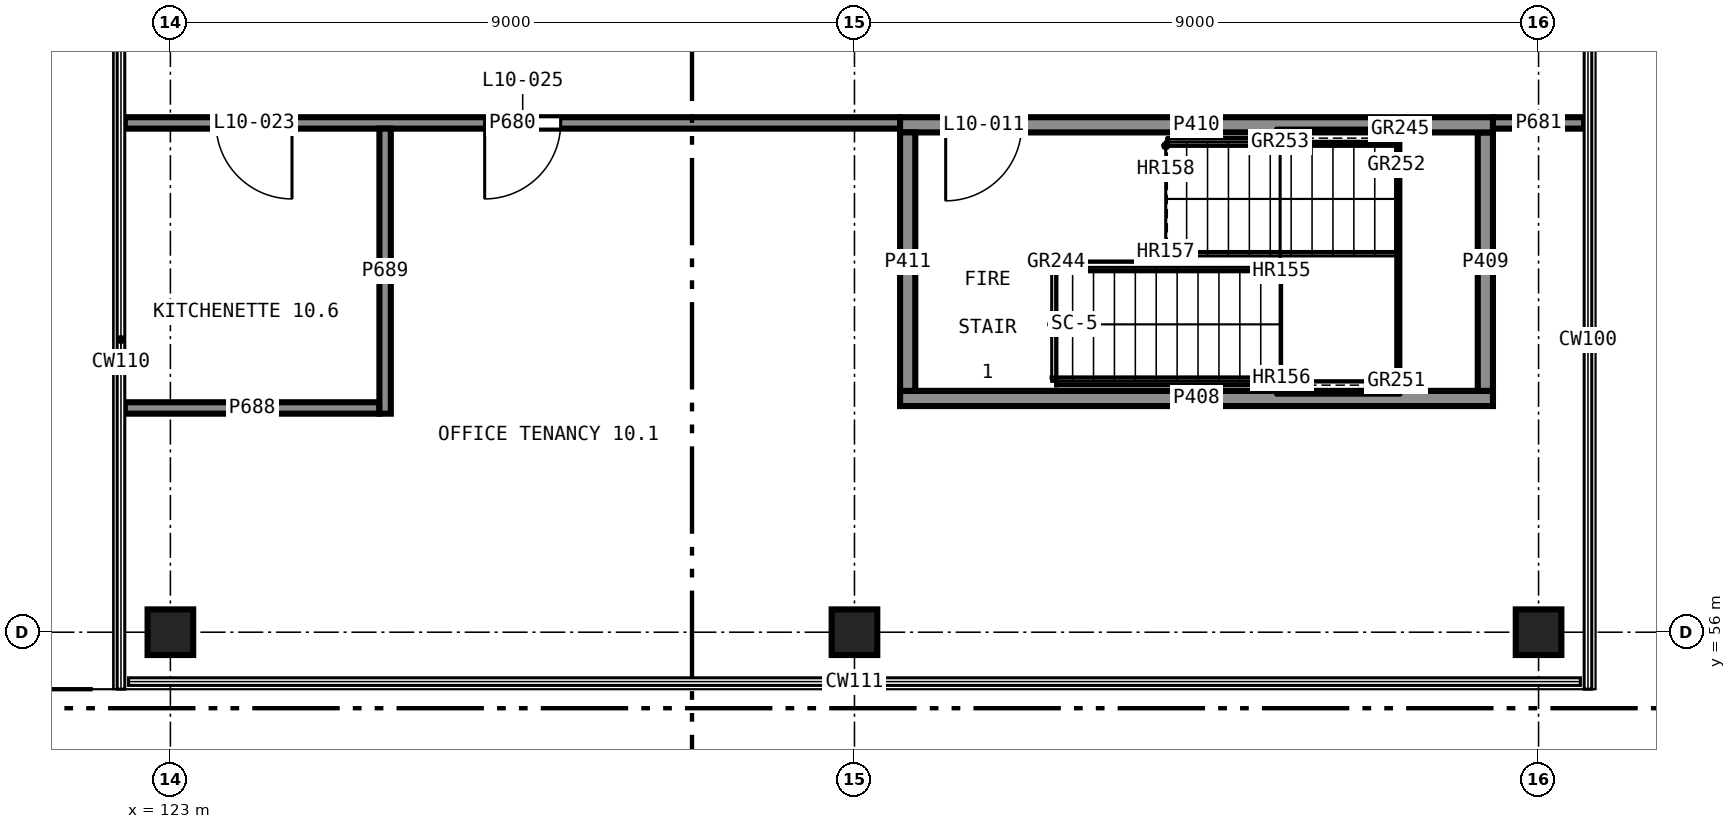
"""IFC4 building model, lengths in metres.
Left out: names, types, materials, properties, quantities, classifications, styles, units other than length and angle.
Written with IfcOpenShell. Run it as: python <this file> out.ifc"""

import sys

from ifc_helpers import new_model, si_unit, direction, frame, frame_2d, origin, origin_2d, place, context, subcontext, project, spatial, rectangle, extrude, element, fill, save


model = new_model("IFC4")
c1 = context("Model", 3, precision=1e-05, world=origin(), true_north=direction((0.0, 1.0)))
c2 = subcontext(c1, "Body", "Model", "MODEL_VIEW")
j1 = project(units=[si_unit("LENGTHUNIT", "METRE"), si_unit("PLANEANGLEUNIT", "RADIAN")], contexts=[c1])
p1 = place(None, origin())
s1 = spatial("IfcSite", under=j1, at=p1, CompositionType="ELEMENT")
p2 = place(p1, origin())
s2 = spatial("IfcBuilding", under=s1, at=p2, CompositionType="ELEMENT")
p3 = place(p2, frame((0.0, 0.0, 41.5)))
s3 = spatial("IfcBuildingStorey", under=s2, at=p3, CompositionType="ELEMENT", Elevation=41.5)
for number, where, z_axis, x_axis in (
    (1, (123.0, 56.0, 0.0), (0.0, 0.0, 1.0), (1.0, 0.0, 0.0)),
    (2, (132.0, 56.0, 0.0), (0.0, 0.0, 1.0), (1.0, 0.0, 0.0)),
    (3, (141.0, 56.0, 0.0), (0.0, 0.0, 1.0), (1.0, 0.0, 0.0)),
):
    element("IfcColumn", number, at=place(p3, frame(where, z_axis=z_axis, x_axis=x_axis)), inside=s3, PredefinedType="COLUMN", context=c2, shape_type="SweptSolid", body=[
        extrude(rectangle(XDim=0.6, YDim=0.6, at=origin_2d()), origin(), (0.0, 0.0, 1.0), 4.0),
    ])
p4 = place(p3, frame((132.6, 59.075, 0.0), z_axis=(0.0, 0.0, 1.0), x_axis=(1.0, 0.0, 0.0)))
e4 = element("IfcWall", 4, at=p4, inside=s3, PredefinedType="SHEAR", context=c2, shape_type="SweptSolid", body=[
    extrude(rectangle(XDim=7.8, YDim=0.2, at=frame_2d((3.9, 0.0))), origin(), (0.0, 0.0, 1.0), 3.75),
])
p5 = place(p3, frame((140.3, 59.175, 0.0), z_axis=(0.0, 0.0, 1.0), x_axis=(0.0, 1.0, 0.0)))
e5 = element("IfcWall", 5, at=p5, inside=s3, PredefinedType="SHEAR", context=c2, shape_type="SweptSolid", body=[
    extrude(rectangle(XDim=3.4, YDim=0.2, at=frame_2d((1.7, 0.0))), origin(), (0.0, 0.0, 1.0), 3.75),
])
p6 = place(p3, frame((140.4, 62.675, 0.0), z_axis=(0.0, 0.0, 1.0), x_axis=(-1.0, 0.0, 0.0)))
e6 = element("IfcWall", 6, at=p6, inside=s3, PredefinedType="SHEAR", context=c2, shape_type="SweptSolid", body=[
    extrude(rectangle(XDim=7.8, YDim=0.2, at=frame_2d((3.9, 0.0))), origin(), (0.0, 0.0, 1.0), 3.75),
])
p7 = place(p6, frame((6.2, 0.0, 0.0)))
e7 = element("IfcOpeningElement", 7, at=p7, cuts=e6, PredefinedType="OPENING", context=c2, shape_type="SweptSolid", body=[
    extrude(rectangle(XDim=1.0, YDim=2.1, at=frame_2d((0.5, 1.05))), frame((0.0, 0.11, 0.0), z_axis=(0.0, -1.0, 0.0), x_axis=(1.0, 0.0, 0.0)), (0.0, 0.0, 1.0), 0.22),
])
p8 = place(p3, frame((132.7, 62.575, 0.0), z_axis=(0.0, 0.0, 1.0), x_axis=(0.0, -1.0, 0.0)))
e8 = element("IfcWall", 8, at=p8, inside=s3, PredefinedType="SHEAR", context=c2, shape_type="SweptSolid", body=[
    extrude(rectangle(XDim=3.4, YDim=0.2, at=frame_2d((1.7, 0.0))), origin(), (0.0, 0.0, 1.0), 3.75),
])
p9 = place(p3, frame((132.6, 62.7, 0.0), z_axis=(0.0, 0.0, 1.0), x_axis=(-1.0, 0.0, 0.0)))
e9 = element("IfcWall", 9, at=p9, inside=s3, PredefinedType="PARTITIONING", context=c2, shape_type="SweptSolid", body=[
    extrude(rectangle(XDim=10.2, YDim=0.15, at=frame_2d((5.1, 0.0))), origin(), (0.0, 0.0, 1.0), 3.75),
])
p10 = place(p9, frame((8.0, 0.0, 0.0)))
e10 = element("IfcOpeningElement", 10, at=p10, cuts=e9, PredefinedType="OPENING", context=c2, shape_type="SweptSolid", body=[
    extrude(rectangle(XDim=1.0, YDim=2.1, at=frame_2d((0.5, 1.05))), frame((0.0, 0.085, 0.0), z_axis=(0.0, -1.0, 0.0), x_axis=(1.0, 0.0, 0.0)), (0.0, 0.0, 1.0), 0.17),
])
p11 = place(p9, frame((4.465, 0.0, 0.0)))
e11 = element("IfcOpeningElement", 11, at=p11, cuts=e9, PredefinedType="OPENING", context=c2, shape_type="SweptSolid", body=[
    extrude(rectangle(XDim=1.0, YDim=2.1, at=frame_2d((0.5, 1.05))), frame((0.0, 0.085, 0.0), z_axis=(0.0, -1.0, 0.0), x_axis=(1.0, 0.0, 0.0)), (0.0, 0.0, 1.0), 0.17),
])
p12 = place(p3, frame((141.6, 62.7, 0.0), z_axis=(0.0, 0.0, 1.0), x_axis=(-1.0, 0.0, 0.0)))
e12 = element("IfcWall", 12, at=p12, inside=s3, PredefinedType="PARTITIONING", context=c2, shape_type="SweptSolid", body=[
    extrude(rectangle(XDim=1.2, YDim=0.15, at=frame_2d((0.6, 0.0))), origin(), (0.0, 0.0, 1.0), 3.75),
])
p13 = place(p3, frame((122.4, 58.95, 0.0), z_axis=(0.0, 0.0, 1.0), x_axis=(1.0, 0.0, 0.0)))
e13 = element("IfcWall", 13, at=p13, inside=s3, PredefinedType="PARTITIONING", context=c2, shape_type="SweptSolid", body=[
    extrude(rectangle(XDim=3.35, YDim=0.15, at=frame_2d((1.675, 0.0))), origin(), (0.0, 0.0, 1.0), 3.75),
])
p14 = place(p3, frame((125.825, 62.625, 0.0), z_axis=(0.0, 0.0, 1.0), x_axis=(0.0, -1.0, 0.0)))
e14 = element("IfcWall", 14, at=p14, inside=s3, PredefinedType="PARTITIONING", context=c2, shape_type="SweptSolid", body=[
    extrude(rectangle(XDim=3.75, YDim=0.15, at=frame_2d((1.875, 0.0))), origin(), (0.0, 0.0, 1.0), 3.75),
])
p15 = place(p7, origin())
e15 = element("IfcDoor", 15, at=p15, inside=s3, OperationType="SINGLE_SWING_LEFT", PredefinedType="DOOR", context=c2, shape_type="SweptSolid", body=[
    extrude(rectangle(XDim=1.0, YDim=2.1, at=frame_2d((0.5, 1.05))), frame((0.0, 0.025, 0.0), z_axis=(0.0, -1.0, 0.0), x_axis=(1.0, 0.0, 0.0)), (0.0, 0.0, 1.0), 0.05),
])
fill(e7, e15)
p16 = place(p10, origin())
e16 = element("IfcDoor", 16, at=p16, inside=s3, OperationType="SINGLE_SWING_RIGHT", PredefinedType="DOOR", context=c2, shape_type="SweptSolid", body=[
    extrude(rectangle(XDim=1.0, YDim=2.1, at=frame_2d((0.5, 1.05))), frame((0.0, 0.025, 0.0), z_axis=(0.0, -1.0, 0.0), x_axis=(1.0, 0.0, 0.0)), (0.0, 0.0, 1.0), 0.05),
])
fill(e10, e16)
p17 = place(p11, origin())
e17 = element("IfcDoor", 17, at=p17, inside=s3, OperationType="SINGLE_SWING_LEFT", PredefinedType="DOOR", context=c2, shape_type="SweptSolid", body=[
    extrude(rectangle(XDim=1.0, YDim=2.1, at=frame_2d((0.5, 1.05))), frame((0.0, 0.025, 0.0), z_axis=(0.0, -1.0, 0.0), x_axis=(1.0, 0.0, 0.0)), (0.0, 0.0, 1.0), 0.05),
])
fill(e11, e17)
save(model, sys.argv[1])
